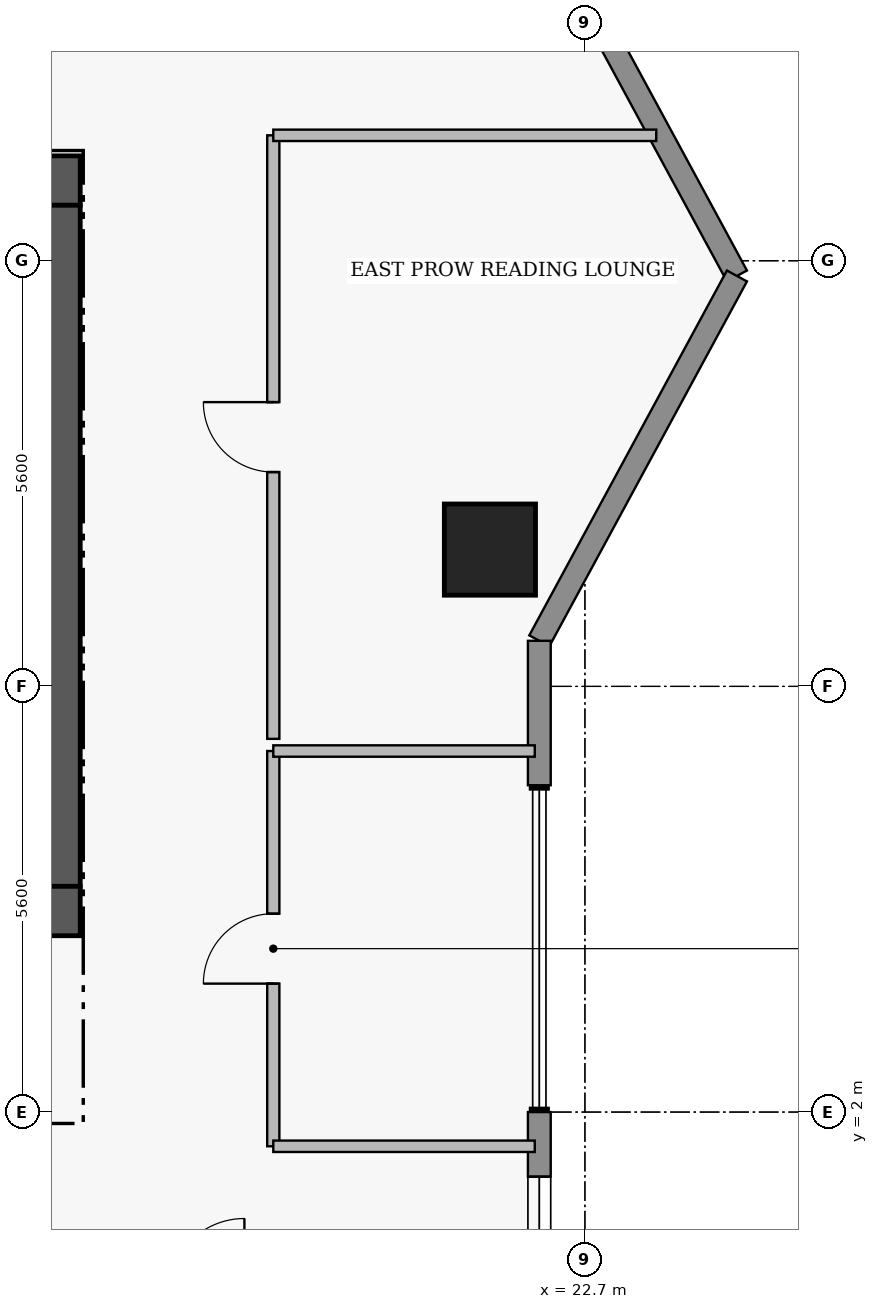
"""IFC4 building model, lengths in metres.
Left out: names, types, materials, properties, quantities, classifications, styles, units other than length and angle.
Written with IfcOpenShell. Run it as: python <this file> out.ifc"""

import sys

from ifc_helpers import new_model, si_unit, direction, frame, frame_2d, origin, origin_2d, place, context, subcontext, project, spatial, rectangle, extrude, element, fill, save


model = new_model("IFC4")
c1 = context("Model", 3, precision=1e-05, world=origin(), true_north=direction((0.0, 1.0)))
c2 = subcontext(c1, "Body", "Model", "MODEL_VIEW")
j1 = project(units=[si_unit("LENGTHUNIT", "METRE"), si_unit("PLANEANGLEUNIT", "RADIAN")], contexts=[c1])
p1 = place(None, origin())
s1 = spatial("IfcSite", under=j1, at=p1, CompositionType="ELEMENT")
p2 = place(p1, origin())
s2 = spatial("IfcBuilding", under=s1, at=p2, CompositionType="ELEMENT")
p3 = place(p2, frame((0.0, 0.0, 211.15)))
s3 = spatial("IfcBuildingStorey", under=s2, at=p3, CompositionType="ELEMENT", Elevation=211.15)
p4 = place(p3, frame((11.6, 14.255, 0.0), z_axis=(0.0, 0.0, 1.0), x_axis=(1.0, 0.0, 0.0)))
e1 = element("IfcWall", 1, at=p4, inside=s3, PredefinedType="SHEAR", context=c2, shape_type="SweptSolid", body=[
    extrude(rectangle(XDim=4.46, YDim=0.65, at=frame_2d((2.23, 0.0))), origin(), (0.0, 0.0, 1.0), 3.56),
])
p5 = place(p3, frame((15.735, 4.97, 0.0), z_axis=(0.0, 0.0, 1.0), x_axis=(0.0, 1.0, 0.0)))
e2 = element("IfcWall", 2, at=p5, inside=s3, PredefinedType="SHEAR", context=c2, shape_type="SweptSolid", body=[
    extrude(rectangle(XDim=8.96, YDim=0.65, at=frame_2d((4.48, 0.0))), origin(), (0.0, 0.0, 1.0), 3.56),
])
p6 = place(p3, frame((11.6, 4.645, 0.0), z_axis=(0.0, 0.0, 1.0), x_axis=(1.0, 0.0, 0.0)))
e3 = element("IfcWall", 3, at=p6, inside=s3, PredefinedType="SHEAR", context=c2, shape_type="SweptSolid", body=[
    extrude(rectangle(XDim=4.46, YDim=0.65, at=frame_2d((2.23, 0.0))), origin(), (0.0, 0.0, 1.0), 3.56),
])
p7 = place(p3, frame((21.45, 9.4, 0.0), z_axis=(0.0, 0.0, 1.0), x_axis=(1.0, 0.0, 0.0)))
e4 = element("IfcColumn", 4, at=p7, inside=s3, PredefinedType="COLUMN", context=c2, shape_type="SweptSolid", body=[
    extrude(rectangle(XDim=1.2, YDim=1.2, at=origin_2d()), origin(), (0.0, 0.0, 1.0), 3.75),
])
for number, where, z_axis, x_axis in (
    (5, (22.1, 17.8, 0.0), (0.0, 0.0, 1.0), (0.476, -0.879, 0.0)),
    (6, (24.7, 13.0, 0.0), (0.0, 0.0, 1.0), (-0.476, -0.879, 0.0)),
):
    element("IfcWall", number, at=place(p3, frame(where, z_axis=z_axis, x_axis=x_axis)), inside=s3, PredefinedType="STANDARD", context=c2, shape_type="SweptSolid", body=[
        extrude(rectangle(XDim=5.459, YDim=0.3, at=frame_2d((2.729, 0.0))), origin(), (0.0, 0.0, 1.0), 3.53),
    ])
p8 = place(p3, frame((22.1, 8.2, 0.0), z_axis=(0.0, 0.0, 1.0), x_axis=(0.0, -1.0, 0.0)))
e7 = element("IfcWall", 7, at=p8, inside=s3, PredefinedType="STANDARD", context=c2, shape_type="SweptSolid", body=[
    extrude(rectangle(XDim=1.9, YDim=0.3, at=frame_2d((0.95, 0.0))), origin(), (0.0, 0.0, 1.0), 3.53),
])
p9 = place(p3, frame((22.1, 2.0, 0.0), z_axis=(0.0, 0.0, 1.0), x_axis=(0.0, -1.0, 0.0)))
e8 = element("IfcWall", 8, at=p9, inside=s3, PredefinedType="STANDARD", context=c2, shape_type="SweptSolid", body=[
    extrude(rectangle(XDim=2.85, YDim=0.3, at=frame_2d((1.425, 0.0))), origin(), (0.0, 0.0, 1.0), 3.53),
])
p10 = place(p9, frame((0.85, 0.0, 0.95)))
e9 = element("IfcOpeningElement", 9, at=p10, cuts=e8, PredefinedType="OPENING", context=c2, shape_type="SweptSolid", body=[
    extrude(rectangle(XDim=1.15, YDim=1.55, at=frame_2d((0.575, 0.775))), frame((0.0, 0.16, 0.0), z_axis=(0.0, -1.0, 0.0), x_axis=(1.0, 0.0, 0.0)), (0.0, 0.0, 1.0), 0.32),
])
p11 = place(p3, frame((18.6, 1.55, 0.0), z_axis=(0.0, 0.0, 1.0), x_axis=(0.0, 1.0, 0.0)))
e10 = element("IfcWall", 10, at=p11, inside=s3, PredefinedType="PARTITIONING", context=c2, shape_type="SweptSolid", body=[
    extrude(rectangle(XDim=5.2, YDim=0.16, at=frame_2d((2.6, 0.0))), origin(), (0.0, 0.0, 1.0), 3.53),
])
p12 = place(p11, frame((2.14, 0.0, 0.0)))
e11 = element("IfcOpeningElement", 11, at=p12, cuts=e10, PredefinedType="OPENING", context=c2, shape_type="SweptSolid", body=[
    extrude(rectangle(XDim=0.92, YDim=2.12, at=frame_2d((0.46, 1.06))), frame((0.0, 0.09, 0.0), z_axis=(0.0, -1.0, 0.0), x_axis=(1.0, 0.0, 0.0)), (0.0, 0.0, 1.0), 0.18),
])
p13 = place(p3, frame((18.6, 6.91, 0.0), z_axis=(0.0, 0.0, 1.0), x_axis=(0.0, 1.0, 0.0)))
e12 = element("IfcWall", 12, at=p13, inside=s3, PredefinedType="PARTITIONING", context=c2, shape_type="SweptSolid", body=[
    extrude(rectangle(XDim=7.94, YDim=0.16, at=frame_2d((3.97, 0.0))), origin(), (0.0, 0.0, 1.0), 3.53),
])
p14 = place(p13, frame((3.51, 0.0, 0.0)))
e13 = element("IfcOpeningElement", 13, at=p14, cuts=e12, PredefinedType="OPENING", context=c2, shape_type="SweptSolid", body=[
    extrude(rectangle(XDim=0.92, YDim=2.12, at=frame_2d((0.46, 1.06))), frame((0.0, 0.09, 0.0), z_axis=(0.0, -1.0, 0.0), x_axis=(1.0, 0.0, 0.0)), (0.0, 0.0, 1.0), 0.18),
])
for number, where, z_axis, x_axis in (
    (14, (18.6, 1.55, 0.0), (0.0, 0.0, 1.0), (1.0, 0.0, 0.0)),
    (15, (18.6, 6.75, 0.0), (0.0, 0.0, 1.0), (1.0, 0.0, 0.0)),
):
    element("IfcWall", number, at=place(p3, frame(where, z_axis=z_axis, x_axis=x_axis)), inside=s3, PredefinedType="PARTITIONING", context=c2, shape_type="SweptSolid", body=[
        extrude(rectangle(XDim=3.44, YDim=0.15, at=frame_2d((1.72, 0.0))), origin(), (0.0, 0.0, 1.0), 3.53),
    ])
p15 = place(p3, frame((18.6, 14.85, 0.0), z_axis=(0.0, 0.0, 1.0), x_axis=(1.0, 0.0, 0.0)))
e16 = element("IfcWall", 16, at=p15, inside=s3, PredefinedType="PARTITIONING", context=c2, shape_type="SweptSolid", body=[
    extrude(rectangle(XDim=5.038, YDim=0.15, at=frame_2d((2.519, 0.0))), origin(), (0.0, 0.0, 1.0), 3.53),
])
p16 = place(p10, origin())
e17 = element("IfcWindow", 17, at=p16, inside=s3, PartitioningType="SINGLE_PANEL", PredefinedType="WINDOW", context=c2, shape_type="SweptSolid", body=[
    extrude(rectangle(XDim=1.15, YDim=1.55, at=frame_2d((0.575, 0.775))), frame((0.0, 0.03, 0.0), z_axis=(0.0, -1.0, 0.0), x_axis=(1.0, 0.0, 0.0)), (0.0, 0.0, 1.0), 0.06),
])
fill(e9, e17)
p17 = place(p12, origin())
e18 = element("IfcDoor", 18, at=p17, inside=s3, OperationType="SINGLE_SWING_LEFT", PredefinedType="DOOR", context=c2, shape_type="SweptSolid", body=[
    extrude(rectangle(XDim=0.92, YDim=2.12, at=frame_2d((0.46, 1.06))), frame((0.0, 0.025, 0.0), z_axis=(0.0, -1.0, 0.0), x_axis=(1.0, 0.0, 0.0)), (0.0, 0.0, 1.0), 0.05),
])
fill(e11, e18)
p18 = place(p14, origin())
e19 = element("IfcDoor", 19, at=p18, inside=s3, OperationType="SINGLE_SWING_RIGHT", PredefinedType="DOOR", context=c2, shape_type="SweptSolid", body=[
    extrude(rectangle(XDim=0.92, YDim=2.12, at=frame_2d((0.46, 1.06))), frame((0.0, 0.025, 0.0), z_axis=(0.0, -1.0, 0.0), x_axis=(1.0, 0.0, 0.0)), (0.0, 0.0, 1.0), 0.05),
])
fill(e13, e19)
save(model, sys.argv[1])
